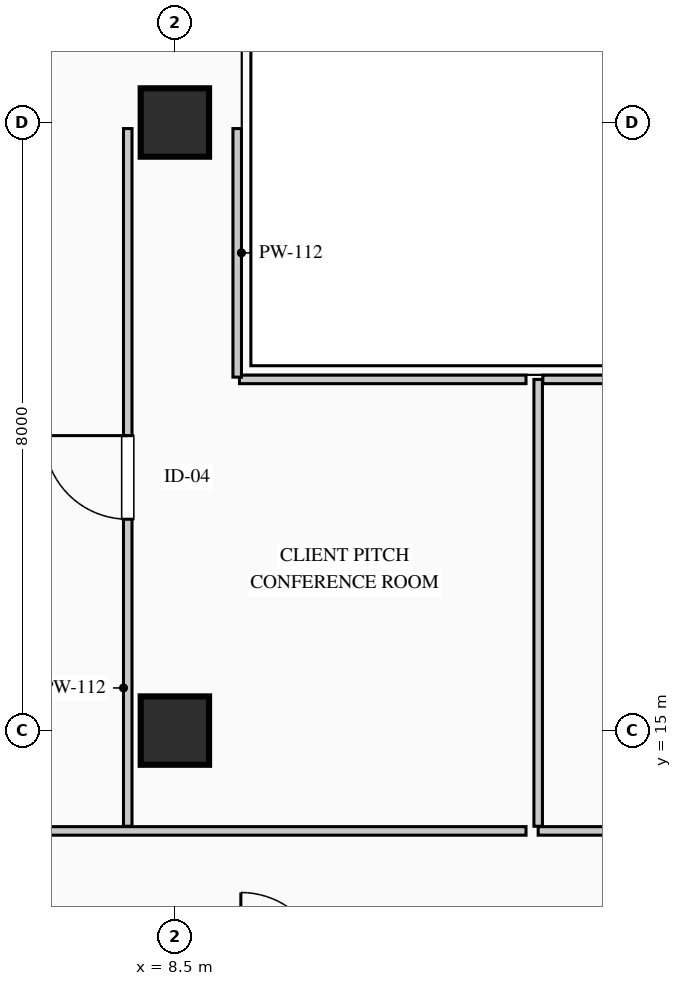
"""IFC4 building model, lengths in metres.
Left out: names, types, materials, properties, quantities, classifications, styles, units other than length and angle.
Written with IfcOpenShell. Run it as: python <this file> out.ifc"""

import sys

from ifc_helpers import new_model, si_unit, direction, frame, frame_2d, origin, origin_2d, place, context, subcontext, project, spatial, rectangle, extrude, element, fill, save


model = new_model("IFC4")
c1 = context("Model", 3, precision=1e-05, world=origin(), true_north=direction((0.0, 1.0)))
c2 = subcontext(c1, "Body", "Model", "MODEL_VIEW")
j1 = project(units=[si_unit("LENGTHUNIT", "METRE"), si_unit("PLANEANGLEUNIT", "RADIAN")], contexts=[c1])
p1 = place(None, origin())
s1 = spatial("IfcSite", under=j1, at=p1, CompositionType="ELEMENT")
p2 = place(p1, origin())
s2 = spatial("IfcBuilding", under=s1, at=p2, CompositionType="ELEMENT")
p3 = place(p2, frame((0.0, 0.0, 203.5)))
s3 = spatial("IfcBuildingStorey", under=s2, at=p3, CompositionType="ELEMENT", Elevation=203.5)
for number, where, z_axis, x_axis in (
    (1, (8.5, 15.0, 0.0), (0.0, 0.0, 1.0), (1.0, 0.0, 0.0)),
    (2, (8.5, 23.0, 0.0), (0.0, 0.0, 1.0), (1.0, 0.0, 0.0)),
):
    element("IfcColumn", number, at=place(p3, frame(where, z_axis=z_axis, x_axis=x_axis)), inside=s3, PredefinedType="COLUMN", context=c2, shape_type="SweptSolid", body=[
        extrude(rectangle(XDim=0.9, YDim=0.9, at=origin_2d()), origin(), (0.0, 0.0, 1.0), 3.95),
    ])
p4 = place(p3, frame((7.469, 4.63, 0.0), z_axis=(0.0, 0.0, 1.0), x_axis=(-0.123515300309, 0.992342667928, 0.0)))
e3 = element("IfcWall", 3, at=p4, inside=s3, PredefinedType="STANDARD", context=c2, shape_type="SweptSolid", body=[
    extrude(rectangle(XDim=37.024, YDim=0.26, at=frame_2d((18.512, 0.0))), origin(), (0.0, 0.0, 1.0), 3.7),
])
p5 = place(p4, frame((11.978, 0.0, 0.9)))
e4 = element("IfcOpeningElement", 4, at=p5, cuts=e3, PredefinedType="OPENING", context=c2, shape_type="SweptSolid", body=[
    extrude(rectangle(XDim=2.7, YDim=2.1, at=frame_2d((1.35, 1.05))), frame((0.0, 0.14, 0.0), z_axis=(0.0, -1.0, 0.0), x_axis=(1.0, 0.0, 0.0)), (0.0, 0.0, 1.0), 0.28),
])
p6 = place(p3, frame((18.329, 13.68, 0.0), z_axis=(0.0, 0.0, 1.0), x_axis=(-1.0, 0.0, 0.0)))
e5 = element("IfcWall", 5, at=p6, inside=s3, PredefinedType="PARTITIONING", context=c2, shape_type="SweptSolid", body=[
    extrude(rectangle(XDim=5.049, YDim=0.112, at=frame_2d((2.524, 0.0))), origin(), (0.0, 0.0, 1.0), 3.7),
])
p7 = place(p3, frame((13.28, 13.741, 0.0), z_axis=(0.0, 0.0, 1.0), x_axis=(0.0, 1.0, 0.0)))
e6 = element("IfcWall", 6, at=p7, inside=s3, PredefinedType="PARTITIONING", context=c2, shape_type="SweptSolid", body=[
    extrude(rectangle(XDim=5.879, YDim=0.112, at=frame_2d((2.939, 0.0))), origin(), (0.0, 0.0, 1.0), 3.7),
])
p8 = place(p3, frame((13.341, 19.62, 0.0), z_axis=(0.0, 0.0, 1.0), x_axis=(1.0, 0.0, 0.0)))
e7 = element("IfcWall", 7, at=p8, inside=s3, PredefinedType="PARTITIONING", context=c2, shape_type="SweptSolid", body=[
    extrude(rectangle(XDim=4.988, YDim=0.112, at=frame_2d((2.494, 0.0))), origin(), (0.0, 0.0, 1.0), 3.7),
])
p9 = place(p3, frame((9.35, 19.62, 0.0), z_axis=(0.0, 0.0, 1.0), x_axis=(1.0, 0.0, 0.0)))
e8 = element("IfcWall", 8, at=p9, inside=s3, PredefinedType="PARTITIONING", context=c2, shape_type="SweptSolid", body=[
    extrude(rectangle(XDim=3.77, YDim=0.112, at=frame_2d((1.885, 0.0))), origin(), (0.0, 0.0, 1.0), 3.7),
])
p10 = place(p3, frame((13.12, 13.68, 0.0), z_axis=(0.0, 0.0, 1.0), x_axis=(-1.0, 0.0, 0.0)))
e9 = element("IfcWall", 9, at=p10, inside=s3, PredefinedType="PARTITIONING", context=c2, shape_type="SweptSolid", body=[
    extrude(rectangle(XDim=6.642, YDim=0.112, at=frame_2d((3.321, 0.0))), origin(), (0.0, 0.0, 1.0), 3.7),
])
p11 = place(p3, frame((7.88, 13.741, 0.0), z_axis=(0.0, 0.0, 1.0), x_axis=(0.0, 1.0, 0.0)))
e10 = element("IfcWall", 10, at=p11, inside=s3, PredefinedType="PARTITIONING", context=c2, shape_type="SweptSolid", body=[
    extrude(rectangle(XDim=9.179, YDim=0.112, at=frame_2d((4.589, 0.0))), origin(), (0.0, 0.0, 1.0), 3.7),
])
p12 = place(p11, frame((4.04, 0.0, 0.0)))
e11 = element("IfcOpeningElement", 11, at=p12, cuts=e10, PredefinedType="OPENING", context=c2, shape_type="SweptSolid", body=[
    extrude(rectangle(XDim=1.1, YDim=2.2, at=frame_2d((0.55, 1.1))), frame((0.0, 0.066, 0.0), z_axis=(0.0, -1.0, 0.0), x_axis=(1.0, 0.0, 0.0)), (0.0, 0.0, 1.0), 0.132),
])
p13 = place(p3, frame((9.32, 22.92, 0.0), z_axis=(0.0, 0.0, 1.0), x_axis=(0.0, -1.0, 0.0)))
e12 = element("IfcWall", 12, at=p13, inside=s3, PredefinedType="PARTITIONING", context=c2, shape_type="SweptSolid", body=[
    extrude(rectangle(XDim=3.27, YDim=0.112, at=frame_2d((1.635, 0.0))), origin(), (0.0, 0.0, 1.0), 3.485),
])
p14 = place(p12, origin())
e13 = element("IfcDoor", 13, at=p14, inside=s3, OperationType="SINGLE_SWING_RIGHT", PredefinedType="DOOR", context=c2, shape_type="SweptSolid", body=[
    extrude(rectangle(XDim=1.1, YDim=2.2, at=frame_2d((0.55, 1.1))), frame((0.0, 0.025, 0.0), z_axis=(0.0, -1.0, 0.0), x_axis=(1.0, 0.0, 0.0)), (0.0, 0.0, 1.0), 0.05),
])
fill(e11, e13)
save(model, sys.argv[1])
